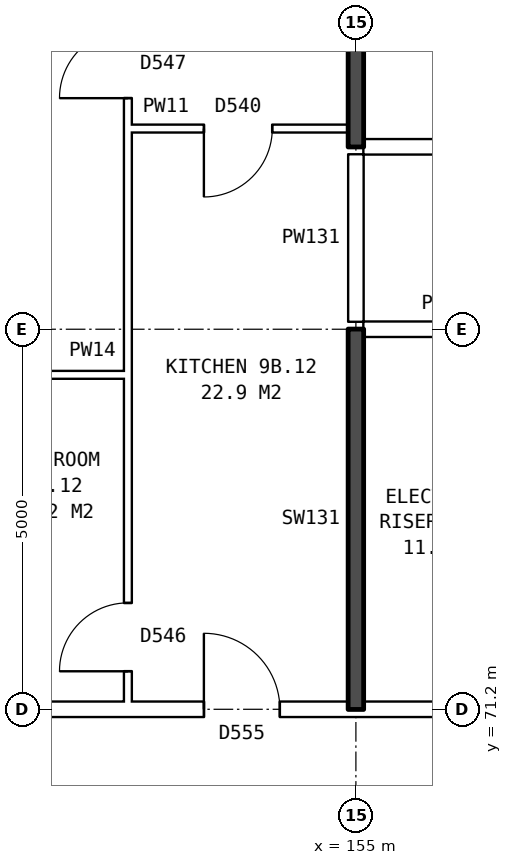
"""IFC4 building model, lengths in metres.
Left out: names, types, materials, properties, quantities, classifications, styles, units other than length and angle.
Written with IfcOpenShell. Run it as: python <this file> out.ifc"""

import sys

from ifc_helpers import new_model, si_unit, direction, frame, frame_2d, origin, place, context, subcontext, project, spatial, rectangle, extrude, element, fill, save


model = new_model("IFC4")
c1 = context("Model", 3, precision=1e-05, world=origin(), true_north=direction((0.0, 1.0)))
c2 = subcontext(c1, "Body", "Model", "MODEL_VIEW")
j1 = project(units=[si_unit("LENGTHUNIT", "METRE"), si_unit("PLANEANGLEUNIT", "RADIAN")], contexts=[c1])
p1 = place(None, origin())
s1 = spatial("IfcSite", under=j1, at=p1, CompositionType="ELEMENT")
p2 = place(p1, origin())
s2 = spatial("IfcBuilding", under=s1, at=p2, CompositionType="ELEMENT")
p3 = place(p2, frame((0.0, 0.0, 35.0)))
s3 = spatial("IfcBuildingStorey", under=s2, at=p3, CompositionType="ELEMENT", Elevation=35.0)
p4 = place(p3, frame((142.76, 71.2, 0.0), z_axis=(0.0, 0.0, 1.0), x_axis=(1.0, 0.0, 0.0)))
e1 = element("IfcWall", 1, at=p4, inside=s3, PredefinedType="PARTITIONING", context=c2, shape_type="SweptSolid", body=[
    extrude(rectangle(XDim=14.48, YDim=0.2, at=frame_2d((7.24, 0.0))), origin(), (0.0, 0.0, 1.0), 2.85),
])
p5 = place(p4, frame((1.12, 0.0, 0.0)))
e2 = element("IfcOpeningElement", 2, at=p5, cuts=e1, PredefinedType="OPENING", context=c2, shape_type="SweptSolid", body=[
    extrude(rectangle(XDim=1.0, YDim=2.1, at=frame_2d((0.5, 1.05))), frame((0.0, 0.11, 0.0), z_axis=(0.0, -1.0, 0.0), x_axis=(1.0, 0.0, 0.0)), (0.0, 0.0, 1.0), 0.22),
])
p6 = place(p4, frame((10.24, 0.0, 0.0)))
e3 = element("IfcOpeningElement", 3, at=p6, cuts=e1, PredefinedType="OPENING", context=c2, shape_type="SweptSolid", body=[
    extrude(rectangle(XDim=1.0, YDim=2.1, at=frame_2d((0.5, 1.05))), frame((0.0, 0.11, 0.0), z_axis=(0.0, -1.0, 0.0), x_axis=(1.0, 0.0, 0.0)), (0.0, 0.0, 1.0), 0.22),
])
p7 = place(p3, frame((149.1, 75.6, 0.0), z_axis=(0.0, 0.0, 1.0), x_axis=(1.0, 0.0, 0.0)))
e4 = element("IfcWall", 4, at=p7, inside=s3, PredefinedType="PARTITIONING", context=c2, shape_type="SweptSolid", body=[
    extrude(rectangle(XDim=2.9, YDim=0.1, at=frame_2d((1.45, 0.0))), origin(), (0.0, 0.0, 1.0), 2.85),
])
p8 = place(p3, frame((155.1, 76.2, 0.0), z_axis=(0.0, 0.0, 1.0), x_axis=(1.0, 0.0, 0.0)))
e5 = element("IfcWall", 5, at=p8, inside=s3, PredefinedType="PARTITIONING", context=c2, shape_type="SweptSolid", body=[
    extrude(rectangle(XDim=2.14, YDim=0.2, at=frame_2d((1.07, 0.0))), origin(), (0.0, 0.0, 1.0), 2.85),
])
p9 = place(p3, frame((155.1, 78.6, 0.0), z_axis=(0.0, 0.0, 1.0), x_axis=(1.0, 0.0, 0.0)))
e6 = element("IfcWall", 6, at=p9, inside=s3, PredefinedType="PARTITIONING", context=c2, shape_type="SweptSolid", body=[
    extrude(rectangle(XDim=22.29, YDim=0.2, at=frame_2d((11.145, 0.0))), origin(), (0.0, 0.0, 1.0), 2.85),
])
p10 = place(p9, frame((1.45, 0.0, 0.0)))
e7 = element("IfcOpeningElement", 7, at=p10, cuts=e6, PredefinedType="OPENING", context=c2, shape_type="SweptSolid", body=[
    extrude(rectangle(XDim=1.0, YDim=2.1, at=frame_2d((0.5, 1.05))), frame((0.0, 0.11, 0.0), z_axis=(0.0, -1.0, 0.0), x_axis=(1.0, 0.0, 0.0)), (0.0, 0.0, 1.0), 0.22),
])
p11 = place(p9, frame((7.4, 0.0, 0.0)))
e8 = element("IfcOpeningElement", 8, at=p11, cuts=e6, PredefinedType="OPENING", context=c2, shape_type="SweptSolid", body=[
    extrude(rectangle(XDim=1.0, YDim=2.1, at=frame_2d((0.5, 1.05))), frame((0.0, 0.11, 0.0), z_axis=(0.0, -1.0, 0.0), x_axis=(1.0, 0.0, 0.0)), (0.0, 0.0, 1.0), 0.22),
])
p12 = place(p9, frame((14.4, 0.0, 0.0)))
e9 = element("IfcOpeningElement", 9, at=p12, cuts=e6, PredefinedType="OPENING", context=c2, shape_type="SweptSolid", body=[
    extrude(rectangle(XDim=1.0, YDim=2.1, at=frame_2d((0.5, 1.05))), frame((0.0, 0.11, 0.0), z_axis=(0.0, -1.0, 0.0), x_axis=(1.0, 0.0, 0.0)), (0.0, 0.0, 1.0), 0.22),
])
p13 = place(p3, frame((152.0, 78.84, 0.0), z_axis=(0.0, 0.0, 1.0), x_axis=(1.0, 0.0, 0.0)))
e10 = element("IfcWall", 10, at=p13, inside=s3, PredefinedType="PARTITIONING", context=c2, shape_type="SweptSolid", body=[
    extrude(rectangle(XDim=2.9, YDim=0.1, at=frame_2d((1.45, 0.0))), origin(), (0.0, 0.0, 1.0), 2.85),
])
p14 = place(p13, frame((1.0, 0.0, 0.0)))
e11 = element("IfcOpeningElement", 11, at=p14, cuts=e10, PredefinedType="OPENING", context=c2, shape_type="SweptSolid", body=[
    extrude(rectangle(XDim=0.9, YDim=2.1, at=frame_2d((0.45, 1.05))), frame((0.0, 0.06, 0.0), z_axis=(0.0, -1.0, 0.0), x_axis=(1.0, 0.0, 0.0)), (0.0, 0.0, 1.0), 0.12),
])
p15 = place(p3, frame((152.0, 71.3, 0.0), z_axis=(0.0, 0.0, 1.0), x_axis=(0.0, 1.0, 0.0)))
e12 = element("IfcWall", 12, at=p15, inside=s3, PredefinedType="PARTITIONING", context=c2, shape_type="SweptSolid", body=[
    extrude(rectangle(XDim=14.34, YDim=0.1, at=frame_2d((7.17, 0.0))), origin(), (0.0, 0.0, 1.0), 2.85),
])
p16 = place(p15, frame((7.94, 0.0, 0.0)))
e13 = element("IfcOpeningElement", 13, at=p16, cuts=e12, PredefinedType="OPENING", context=c2, shape_type="SweptSolid", body=[
    extrude(rectangle(XDim=0.9, YDim=2.1, at=frame_2d((0.45, 1.05))), frame((0.0, 0.06, 0.0), z_axis=(0.0, -1.0, 0.0), x_axis=(1.0, 0.0, 0.0)), (0.0, 0.0, 1.0), 0.12),
])
p17 = place(p15, frame((0.4, 0.0, 0.0)))
e14 = element("IfcOpeningElement", 14, at=p17, cuts=e12, PredefinedType="OPENING", context=c2, shape_type="SweptSolid", body=[
    extrude(rectangle(XDim=0.9, YDim=2.1, at=frame_2d((0.45, 1.05))), frame((0.0, 0.06, 0.0), z_axis=(0.0, -1.0, 0.0), x_axis=(1.0, 0.0, 0.0)), (0.0, 0.0, 1.0), 0.12),
])
p18 = place(p3, frame((155.0, 71.2, 0.0), z_axis=(0.0, 0.0, 1.0), x_axis=(0.0, 1.0, 0.0)))
e15 = element("IfcWall", 15, at=p18, inside=s3, PredefinedType="SOLIDWALL", context=c2, shape_type="SweptSolid", body=[
    extrude(rectangle(XDim=5.0, YDim=0.2, at=frame_2d((2.5, 0.0))), origin(), (0.0, 0.0, 1.0), 2.85),
])
p19 = place(p3, frame((155.0, 76.3, 0.0), z_axis=(0.0, 0.0, 1.0), x_axis=(0.0, 1.0, 0.0)))
e16 = element("IfcWall", 16, at=p19, inside=s3, PredefinedType="PARTITIONING", context=c2, shape_type="SweptSolid", body=[
    extrude(rectangle(XDim=2.2, YDim=0.2, at=frame_2d((1.1, 0.0))), origin(), (0.0, 0.0, 1.0), 2.85),
])
p20 = place(p3, frame((155.0, 78.6, 0.0), z_axis=(0.0, 0.0, 1.0), x_axis=(0.0, 1.0, 0.0)))
e17 = element("IfcWall", 17, at=p20, inside=s3, PredefinedType="SOLIDWALL", context=c2, shape_type="SweptSolid", body=[
    extrude(rectangle(XDim=7.04, YDim=0.2, at=frame_2d((3.52, 0.0))), origin(), (0.0, 0.0, 1.0), 2.85),
])
p21 = place(p16, origin())
e18 = element("IfcDoor", 18, at=p21, inside=s3, OperationType="SINGLE_SWING_LEFT", PredefinedType="DOOR", context=c2, shape_type="SweptSolid", body=[
    extrude(rectangle(XDim=0.9, YDim=2.1, at=frame_2d((0.45, 1.05))), frame((0.0, 0.025, 0.0), z_axis=(0.0, -1.0, 0.0), x_axis=(1.0, 0.0, 0.0)), (0.0, 0.0, 1.0), 0.05),
])
fill(e13, e18)
p22 = place(p6, origin())
e19 = element("IfcDoor", 19, at=p22, inside=s3, OperationType="SINGLE_SWING_LEFT", PredefinedType="DOOR", context=c2, shape_type="SweptSolid", body=[
    extrude(rectangle(XDim=1.0, YDim=2.1, at=frame_2d((0.5, 1.05))), frame((0.0, 0.025, 0.0), z_axis=(0.0, -1.0, 0.0), x_axis=(1.0, 0.0, 0.0)), (0.0, 0.0, 1.0), 0.05),
])
fill(e3, e19)
p23 = place(p14, frame((0.9, 0.0, 0.0), z_axis=(0.0, 0.0, 1.0), x_axis=(-1.0, 0.0, 0.0)))
e20 = element("IfcDoor", 20, at=p23, inside=s3, OperationType="SINGLE_SWING_RIGHT", PredefinedType="DOOR", context=c2, shape_type="SweptSolid", body=[
    extrude(rectangle(XDim=0.9, YDim=2.1, at=frame_2d((0.45, 1.05))), frame((0.0, 0.025, 0.0), z_axis=(0.0, -1.0, 0.0), x_axis=(1.0, 0.0, 0.0)), (0.0, 0.0, 1.0), 0.05),
])
fill(e11, e20)
p24 = place(p17, origin())
e21 = element("IfcDoor", 21, at=p24, inside=s3, OperationType="SINGLE_SWING_LEFT", PredefinedType="DOOR", context=c2, shape_type="SweptSolid", body=[
    extrude(rectangle(XDim=0.9, YDim=2.1, at=frame_2d((0.45, 1.05))), frame((0.0, 0.025, 0.0), z_axis=(0.0, -1.0, 0.0), x_axis=(1.0, 0.0, 0.0)), (0.0, 0.0, 1.0), 0.05),
])
fill(e14, e21)
save(model, sys.argv[1])
